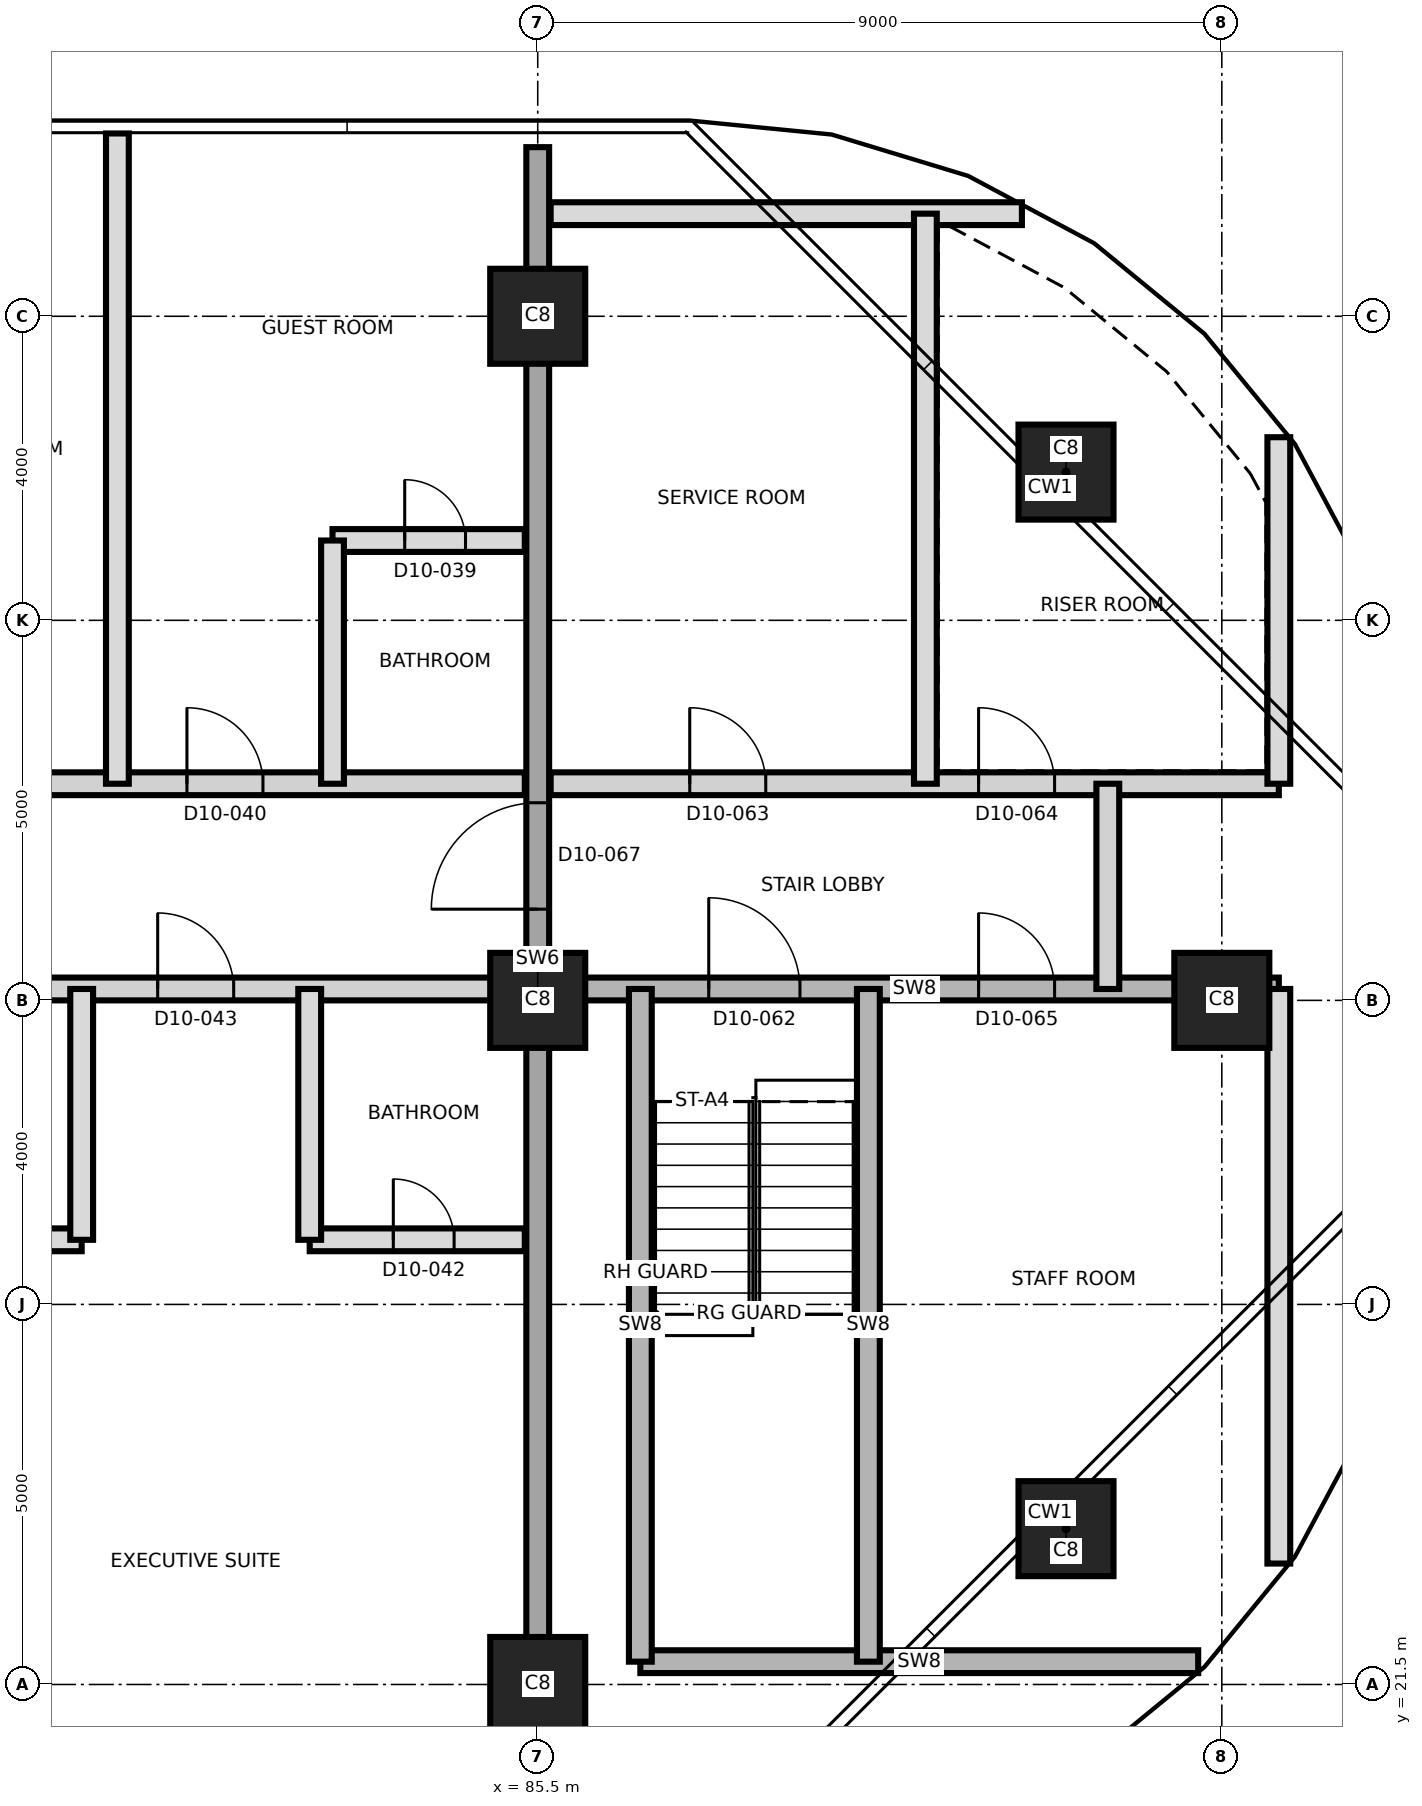
"""IFC4 building model, lengths in metres.
Left out: names, types, materials, properties, quantities, classifications, styles, units other than length and angle.
Written with IfcOpenShell. Run it as: python <this file> out.ifc"""

import sys

from ifc_helpers import new_model, si_unit, direction, frame, frame_2d, origin, origin_2d, place, context, subcontext, project, spatial, rectangle, extrude, element, fill, save


model = new_model("IFC4")
c1 = context("Model", 3, precision=1e-05, world=origin(), true_north=direction((0.0, 1.0)))
c2 = subcontext(c1, "Body", "Model", "MODEL_VIEW")
j1 = project(units=[si_unit("LENGTHUNIT", "METRE"), si_unit("PLANEANGLEUNIT", "RADIAN")], contexts=[c1])
p1 = place(None, origin())
s1 = spatial("IfcSite", under=j1, at=p1, CompositionType="ELEMENT")
p2 = place(p1, origin())
s2 = spatial("IfcBuilding", under=s1, at=p2, CompositionType="ELEMENT")
p3 = place(p2, frame((0.0, 0.0, 120.4)))
s3 = spatial("IfcBuildingStorey", under=s2, at=p3, CompositionType="ELEMENT", Elevation=120.4)
for number, where, z_axis, x_axis in (
    (1, (85.5, 21.5, 0.0), (0.0, 0.0, 1.0), (1.0, 0.0, 0.0)),
    (2, (92.45, 23.55, 0.0), (0.0, 0.0, 1.0), (1.0, 0.0, 0.0)),
    (3, (85.5, 30.5, 0.0), (0.0, 0.0, 1.0), (1.0, 0.0, 0.0)),
    (4, (94.5, 30.5, 0.0), (0.0, 0.0, 1.0), (1.0, 0.0, 0.0)),
    (5, (92.45, 37.45, 0.0), (0.0, 0.0, 1.0), (1.0, 0.0, 0.0)),
    (6, (85.5, 39.5, 0.0), (0.0, 0.0, 1.0), (1.0, 0.0, 0.0)),
):
    element("IfcColumn", number, at=place(p3, frame(where, z_axis=z_axis, x_axis=x_axis)), inside=s3, PredefinedType="COLUMN", context=c2, shape_type="SweptSolid", body=[
        extrude(rectangle(XDim=1.25, YDim=1.25, at=origin_2d()), origin(), (0.0, 0.0, 1.0), 3.7),
    ])
p4 = place(p3, frame((85.5, 19.275, 0.0), z_axis=(0.0, 0.0, 1.0), x_axis=(0.0, 1.0, 0.0)))
e7 = element("IfcWall", 7, at=p4, inside=s3, PredefinedType="SHEAR", context=c2, shape_type="SweptSolid", body=[
    extrude(rectangle(XDim=22.45, YDim=0.3, at=frame_2d((11.225, 0.0))), origin(), (0.0, 0.0, 1.0), 3.7),
])
p5 = place(p4, frame((12.425, 0.0, 0.0)))
e8 = element("IfcOpeningElement", 8, at=p5, cuts=e7, PredefinedType="OPENING", context=c2, shape_type="SweptSolid", body=[
    extrude(rectangle(XDim=1.4, YDim=2.1, at=frame_2d((0.7, 1.05))), frame((0.0, 0.16, 0.0), z_axis=(0.0, -1.0, 0.0), x_axis=(1.0, 0.0, 0.0)), (0.0, 0.0, 1.0), 0.32),
])
p6 = place(p3, frame((86.85, 21.8, 0.0), z_axis=(0.0, 0.0, 1.0), x_axis=(1.0, 0.0, 0.0)))
e9 = element("IfcWall", 9, at=p6, inside=s3, PredefinedType="SHEAR", context=c2, shape_type="SweptSolid", body=[
    extrude(rectangle(XDim=7.339, YDim=0.3, at=frame_2d((3.669, 0.0))), origin(), (0.0, 0.0, 1.0), 3.4),
])
p7 = place(p3, frame((73.5, 27.35, 0.0), z_axis=(0.0, 0.0, 1.0), x_axis=(1.0, 0.0, 0.0)))
e10 = element("IfcWall", 10, at=p7, inside=s3, PredefinedType="PARTITIONING", context=c2, shape_type="SweptSolid", body=[
    extrude(rectangle(XDim=6.0, YDim=0.3, at=frame_2d((3.0, 0.0))), origin(), (0.0, 0.0, 1.0), 3.4),
])
p8 = place(p7, frame((1.1, 0.0, 0.0)))
e11 = element("IfcOpeningElement", 11, at=p8, cuts=e10, PredefinedType="OPENING", context=c2, shape_type="SweptSolid", body=[
    extrude(rectangle(XDim=0.8, YDim=2.1, at=frame_2d((0.4, 1.05))), frame((0.0, 0.16, 0.0), z_axis=(0.0, -1.0, 0.0), x_axis=(1.0, 0.0, 0.0)), (0.0, 0.0, 1.0), 0.32),
])
p9 = place(p7, frame((4.1, 0.0, 0.0)))
e12 = element("IfcOpeningElement", 12, at=p9, cuts=e10, PredefinedType="OPENING", context=c2, shape_type="SweptSolid", body=[
    extrude(rectangle(XDim=0.8, YDim=2.1, at=frame_2d((0.4, 1.05))), frame((0.0, 0.16, 0.0), z_axis=(0.0, -1.0, 0.0), x_axis=(1.0, 0.0, 0.0)), (0.0, 0.0, 1.0), 0.32),
])
p10 = place(p3, frame((82.5, 27.35, 0.0), z_axis=(0.0, 0.0, 1.0), x_axis=(1.0, 0.0, 0.0)))
e13 = element("IfcWall", 13, at=p10, inside=s3, PredefinedType="PARTITIONING", context=c2, shape_type="SweptSolid", body=[
    extrude(rectangle(XDim=2.83, YDim=0.3, at=frame_2d((1.415, 0.0))), origin(), (0.0, 0.0, 1.0), 3.4),
])
p11 = place(p10, frame((1.1, 0.0, 0.0)))
e14 = element("IfcOpeningElement", 14, at=p11, cuts=e13, PredefinedType="OPENING", context=c2, shape_type="SweptSolid", body=[
    extrude(rectangle(XDim=0.8, YDim=2.1, at=frame_2d((0.4, 1.05))), frame((0.0, 0.16, 0.0), z_axis=(0.0, -1.0, 0.0), x_axis=(1.0, 0.0, 0.0)), (0.0, 0.0, 1.0), 0.32),
])
p12 = place(p3, frame((58.8, 30.65, 0.0), z_axis=(0.0, 0.0, 1.0), x_axis=(1.0, 0.0, 0.0)))
e15 = element("IfcWall", 15, at=p12, inside=s3, PredefinedType="PARTITIONING", context=c2, shape_type="SweptSolid", body=[
    extrude(rectangle(XDim=26.53, YDim=0.3, at=frame_2d((13.265, 0.0))), origin(), (0.0, 0.0, 1.0), 3.4),
])
p13 = place(p12, frame((0.835, 0.0, 0.0)))
e16 = element("IfcOpeningElement", 16, at=p13, cuts=e15, PredefinedType="OPENING", context=c2, shape_type="SweptSolid", body=[
    extrude(rectangle(XDim=1.2, YDim=2.1, at=frame_2d((0.6, 1.05))), frame((0.0, 0.16, 0.0), z_axis=(0.0, -1.0, 0.0), x_axis=(1.0, 0.0, 0.0)), (0.0, 0.0, 1.0), 0.32),
])
p14 = place(p12, frame((4.085, 0.0, 0.0)))
e17 = element("IfcOpeningElement", 17, at=p14, cuts=e15, PredefinedType="OPENING", context=c2, shape_type="SweptSolid", body=[
    extrude(rectangle(XDim=1.0, YDim=2.1, at=frame_2d((0.5, 1.05))), frame((0.0, 0.16, 0.0), z_axis=(0.0, -1.0, 0.0), x_axis=(1.0, 0.0, 0.0)), (0.0, 0.0, 1.0), 0.32),
])
p15 = place(p12, frame((12.7, 0.0, 0.0)))
e18 = element("IfcOpeningElement", 18, at=p15, cuts=e15, PredefinedType="OPENING", context=c2, shape_type="SweptSolid", body=[
    extrude(rectangle(XDim=1.0, YDim=2.4, at=frame_2d((0.5, 1.2))), frame((0.0, 0.16, 0.0), z_axis=(0.0, -1.0, 0.0), x_axis=(1.0, 0.0, 0.0)), (0.0, 0.0, 1.0), 0.32),
])
p16 = place(p12, frame((21.7, 0.0, 0.0)))
e19 = element("IfcOpeningElement", 19, at=p16, cuts=e15, PredefinedType="OPENING", context=c2, shape_type="SweptSolid", body=[
    extrude(rectangle(XDim=1.0, YDim=2.4, at=frame_2d((0.5, 1.2))), frame((0.0, 0.16, 0.0), z_axis=(0.0, -1.0, 0.0), x_axis=(1.0, 0.0, 0.0)), (0.0, 0.0, 1.0), 0.32),
])
p17 = place(p3, frame((85.67, 30.65, 0.0), z_axis=(0.0, 0.0, 1.0), x_axis=(1.0, 0.0, 0.0)))
e20 = element("IfcWall", 20, at=p17, inside=s3, PredefinedType="SHEAR", context=c2, shape_type="SweptSolid", body=[
    extrude(rectangle(XDim=9.58, YDim=0.3, at=frame_2d((4.79, 0.0))), origin(), (0.0, 0.0, 1.0), 3.4),
])
p18 = place(p17, frame((2.08, 0.0, 0.0)))
e21 = element("IfcOpeningElement", 21, at=p18, cuts=e20, PredefinedType="OPENING", context=c2, shape_type="SweptSolid", body=[
    extrude(rectangle(XDim=1.2, YDim=2.1, at=frame_2d((0.6, 1.05))), frame((0.0, 0.16, 0.0), z_axis=(0.0, -1.0, 0.0), x_axis=(1.0, 0.0, 0.0)), (0.0, 0.0, 1.0), 0.32),
])
p19 = place(p17, frame((5.63, 0.0, 0.0)))
e22 = element("IfcOpeningElement", 22, at=p19, cuts=e20, PredefinedType="OPENING", context=c2, shape_type="SweptSolid", body=[
    extrude(rectangle(XDim=1.0, YDim=2.1, at=frame_2d((0.5, 1.05))), frame((0.0, 0.16, 0.0), z_axis=(0.0, -1.0, 0.0), x_axis=(1.0, 0.0, 0.0)), (0.0, 0.0, 1.0), 0.32),
])
p20 = place(p3, frame((58.8, 33.35, 0.0), z_axis=(0.0, 0.0, 1.0), x_axis=(1.0, 0.0, 0.0)))
e23 = element("IfcWall", 23, at=p20, inside=s3, PredefinedType="PARTITIONING", context=c2, shape_type="SweptSolid", body=[
    extrude(rectangle(XDim=26.53, YDim=0.3, at=frame_2d((13.265, 0.0))), origin(), (0.0, 0.0, 1.0), 3.4),
])
p21 = place(p20, frame((0.85, 0.0, 0.0)))
e24 = element("IfcOpeningElement", 24, at=p21, cuts=e23, PredefinedType="OPENING", context=c2, shape_type="SweptSolid", body=[
    extrude(rectangle(XDim=1.0, YDim=2.1, at=frame_2d((0.5, 1.05))), frame((0.0, 0.16, 0.0), z_axis=(0.0, -1.0, 0.0), x_axis=(1.0, 0.0, 0.0)), (0.0, 0.0, 1.0), 0.32),
])
p22 = place(p20, frame((6.7, 0.0, 0.0)))
e25 = element("IfcOpeningElement", 25, at=p22, cuts=e23, PredefinedType="OPENING", context=c2, shape_type="SweptSolid", body=[
    extrude(rectangle(XDim=1.0, YDim=2.1, at=frame_2d((0.5, 1.05))), frame((0.0, 0.16, 0.0), z_axis=(0.0, -1.0, 0.0), x_axis=(1.0, 0.0, 0.0)), (0.0, 0.0, 1.0), 0.32),
])
p23 = place(p20, frame((9.55, 0.0, 0.0)))
e26 = element("IfcOpeningElement", 26, at=p23, cuts=e23, PredefinedType="OPENING", context=c2, shape_type="SweptSolid", body=[
    extrude(rectangle(XDim=1.0, YDim=2.1, at=frame_2d((0.5, 1.05))), frame((0.0, 0.16, 0.0), z_axis=(0.0, -1.0, 0.0), x_axis=(1.0, 0.0, 0.0)), (0.0, 0.0, 1.0), 0.32),
])
p24 = place(p20, frame((15.4, 0.0, 0.0)))
e27 = element("IfcOpeningElement", 27, at=p24, cuts=e23, PredefinedType="OPENING", context=c2, shape_type="SweptSolid", body=[
    extrude(rectangle(XDim=1.0, YDim=2.1, at=frame_2d((0.5, 1.05))), frame((0.0, 0.16, 0.0), z_axis=(0.0, -1.0, 0.0), x_axis=(1.0, 0.0, 0.0)), (0.0, 0.0, 1.0), 0.32),
])
p25 = place(p20, frame((18.835, 0.0, 0.0)))
e28 = element("IfcOpeningElement", 28, at=p25, cuts=e23, PredefinedType="OPENING", context=c2, shape_type="SweptSolid", body=[
    extrude(rectangle(XDim=1.2, YDim=2.1, at=frame_2d((0.6, 1.05))), frame((0.0, 0.16, 0.0), z_axis=(0.0, -1.0, 0.0), x_axis=(1.0, 0.0, 0.0)), (0.0, 0.0, 1.0), 0.32),
])
p26 = place(p20, frame((22.085, 0.0, 0.0)))
e29 = element("IfcOpeningElement", 29, at=p26, cuts=e23, PredefinedType="OPENING", context=c2, shape_type="SweptSolid", body=[
    extrude(rectangle(XDim=1.0, YDim=2.1, at=frame_2d((0.5, 1.05))), frame((0.0, 0.16, 0.0), z_axis=(0.0, -1.0, 0.0), x_axis=(1.0, 0.0, 0.0)), (0.0, 0.0, 1.0), 0.32),
])
p27 = place(p3, frame((85.67, 33.35, 0.0), z_axis=(0.0, 0.0, 1.0), x_axis=(1.0, 0.0, 0.0)))
e30 = element("IfcWall", 30, at=p27, inside=s3, PredefinedType="PARTITIONING", context=c2, shape_type="SweptSolid", body=[
    extrude(rectangle(XDim=9.58, YDim=0.3, at=frame_2d((4.79, 0.0))), origin(), (0.0, 0.0, 1.0), 3.4),
])
p28 = place(p27, frame((1.83, 0.0, 0.0)))
e31 = element("IfcOpeningElement", 31, at=p28, cuts=e30, PredefinedType="OPENING", context=c2, shape_type="SweptSolid", body=[
    extrude(rectangle(XDim=1.0, YDim=2.1, at=frame_2d((0.5, 1.05))), frame((0.0, 0.16, 0.0), z_axis=(0.0, -1.0, 0.0), x_axis=(1.0, 0.0, 0.0)), (0.0, 0.0, 1.0), 0.32),
])
p29 = place(p27, frame((5.63, 0.0, 0.0)))
e32 = element("IfcOpeningElement", 32, at=p29, cuts=e30, PredefinedType="OPENING", context=c2, shape_type="SweptSolid", body=[
    extrude(rectangle(XDim=1.0, YDim=2.1, at=frame_2d((0.5, 1.05))), frame((0.0, 0.16, 0.0), z_axis=(0.0, -1.0, 0.0), x_axis=(1.0, 0.0, 0.0)), (0.0, 0.0, 1.0), 0.32),
])
p30 = place(p3, frame((82.8, 36.55, 0.0), z_axis=(0.0, 0.0, 1.0), x_axis=(1.0, 0.0, 0.0)))
e33 = element("IfcWall", 33, at=p30, inside=s3, PredefinedType="PARTITIONING", context=c2, shape_type="SweptSolid", body=[
    extrude(rectangle(XDim=2.53, YDim=0.3, at=frame_2d((1.265, 0.0))), origin(), (0.0, 0.0, 1.0), 3.4),
])
p31 = place(p30, frame((0.95, 0.0, 0.0)))
e34 = element("IfcOpeningElement", 34, at=p31, cuts=e33, PredefinedType="OPENING", context=c2, shape_type="SweptSolid", body=[
    extrude(rectangle(XDim=0.8, YDim=2.1, at=frame_2d((0.4, 1.05))), frame((0.0, 0.16, 0.0), z_axis=(0.0, -1.0, 0.0), x_axis=(1.0, 0.0, 0.0)), (0.0, 0.0, 1.0), 0.32),
])
p32 = place(p3, frame((85.67, 40.85, 0.0), z_axis=(0.0, 0.0, 1.0), x_axis=(1.0, 0.0, 0.0)))
e35 = element("IfcWall", 35, at=p32, inside=s3, PredefinedType="PARTITIONING", context=c2, shape_type="SweptSolid", body=[
    extrude(rectangle(XDim=6.2, YDim=0.3, at=frame_2d((3.1, 0.0))), origin(), (0.0, 0.0, 1.0), 3.35),
])
p33 = place(p3, frame((79.5, 27.35, 0.0), z_axis=(0.0, 0.0, 1.0), x_axis=(0.0, 1.0, 0.0)))
e36 = element("IfcWall", 36, at=p33, inside=s3, PredefinedType="PARTITIONING", context=c2, shape_type="SweptSolid", body=[
    extrude(rectangle(XDim=3.3, YDim=0.3, at=frame_2d((1.65, 0.0))), origin(), (0.0, 0.0, 1.0), 3.4),
])
p34 = place(p3, frame((79.97, 33.35, 0.0), z_axis=(0.0, 0.0, 1.0), x_axis=(0.0, 1.0, 0.0)))
e37 = element("IfcWall", 37, at=p34, inside=s3, PredefinedType="PARTITIONING", context=c2, shape_type="SweptSolid", body=[
    extrude(rectangle(XDim=8.555, YDim=0.3, at=frame_2d((4.277, 0.0))), origin(), (0.0, 0.0, 1.0), 3.35),
])
p35 = place(p3, frame((82.5, 27.35, 0.0), z_axis=(0.0, 0.0, 1.0), x_axis=(0.0, 1.0, 0.0)))
e38 = element("IfcWall", 38, at=p35, inside=s3, PredefinedType="PARTITIONING", context=c2, shape_type="SweptSolid", body=[
    extrude(rectangle(XDim=3.3, YDim=0.3, at=frame_2d((1.65, 0.0))), origin(), (0.0, 0.0, 1.0), 3.4),
])
p36 = place(p3, frame((82.8, 33.35, 0.0), z_axis=(0.0, 0.0, 1.0), x_axis=(0.0, 1.0, 0.0)))
e39 = element("IfcWall", 39, at=p36, inside=s3, PredefinedType="PARTITIONING", context=c2, shape_type="SweptSolid", body=[
    extrude(rectangle(XDim=3.2, YDim=0.3, at=frame_2d((1.6, 0.0))), origin(), (0.0, 0.0, 1.0), 3.4),
])
for number, where, z_axis, x_axis in (
    (40, (86.85, 21.8, 0.0), (0.0, 0.0, 1.0), (0.0, 1.0, 0.0)),
    (41, (89.85, 21.8, 0.0), (0.0, 0.0, 1.0), (0.0, 1.0, 0.0)),
):
    element("IfcWall", number, at=place(p3, frame(where, z_axis=z_axis, x_axis=x_axis)), inside=s3, PredefinedType="SHEAR", context=c2, shape_type="SweptSolid", body=[
        extrude(rectangle(XDim=8.85, YDim=0.3, at=frame_2d((4.425, 0.0))), origin(), (0.0, 0.0, 1.0), 3.4),
    ])
p37 = place(p3, frame((90.6, 33.35, 0.0), z_axis=(0.0, 0.0, 1.0), x_axis=(0.0, 1.0, 0.0)))
e42 = element("IfcWall", 42, at=p37, inside=s3, PredefinedType="PARTITIONING", context=c2, shape_type="SweptSolid", body=[
    extrude(rectangle(XDim=7.5, YDim=0.3, at=frame_2d((3.75, 0.0))), origin(), (0.0, 0.0, 1.0), 3.35),
])
p38 = place(p3, frame((93.0, 30.65, 0.0), z_axis=(0.0, 0.0, 1.0), x_axis=(0.0, 1.0, 0.0)))
e43 = element("IfcWall", 43, at=p38, inside=s3, PredefinedType="PARTITIONING", context=c2, shape_type="SweptSolid", body=[
    extrude(rectangle(XDim=2.7, YDim=0.3, at=frame_2d((1.35, 0.0))), origin(), (0.0, 0.0, 1.0), 3.4),
])
p39 = place(p3, frame((95.25, 23.091, 0.0), z_axis=(0.0, 0.0, 1.0), x_axis=(0.0, 1.0, 0.0)))
e44 = element("IfcWall", 44, at=p39, inside=s3, PredefinedType="PARTITIONING", context=c2, shape_type="SweptSolid", body=[
    extrude(rectangle(XDim=7.559, YDim=0.3, at=frame_2d((3.779, 0.0))), origin(), (0.0, 0.0, 1.0), 3.35),
])
p40 = place(p3, frame((95.25, 33.35, 0.0), z_axis=(0.0, 0.0, 1.0), x_axis=(0.0, 1.0, 0.0)))
e45 = element("IfcWall", 45, at=p40, inside=s3, PredefinedType="PARTITIONING", context=c2, shape_type="SweptSolid", body=[
    extrude(rectangle(XDim=4.559, YDim=0.3, at=frame_2d((2.279, 0.0))), origin(), (0.0, 0.0, 1.0), 3.35),
])
p41 = place(p31, origin())
e46 = element("IfcDoor", 46, at=p41, inside=s3, OperationType="SINGLE_SWING_RIGHT", PredefinedType="DOOR", context=c2, shape_type="SweptSolid", body=[
    extrude(rectangle(XDim=0.8, YDim=2.1, at=frame_2d((0.4, 1.05))), frame((0.0, 0.025, 0.0), z_axis=(0.0, -1.0, 0.0), x_axis=(1.0, 0.0, 0.0)), (0.0, 0.0, 1.0), 0.05),
])
fill(e34, e46)
p42 = place(p26, origin())
e47 = element("IfcDoor", 47, at=p42, inside=s3, OperationType="SINGLE_SWING_LEFT", PredefinedType="DOOR", context=c2, shape_type="SweptSolid", body=[
    extrude(rectangle(XDim=1.0, YDim=2.1, at=frame_2d((0.5, 1.05))), frame((0.0, 0.025, 0.0), z_axis=(0.0, -1.0, 0.0), x_axis=(1.0, 0.0, 0.0)), (0.0, 0.0, 1.0), 0.05),
])
fill(e29, e47)
p43 = place(p11, origin())
e48 = element("IfcDoor", 48, at=p43, inside=s3, OperationType="SINGLE_SWING_RIGHT", PredefinedType="DOOR", context=c2, shape_type="SweptSolid", body=[
    extrude(rectangle(XDim=0.8, YDim=2.1, at=frame_2d((0.4, 1.05))), frame((0.0, 0.025, 0.0), z_axis=(0.0, -1.0, 0.0), x_axis=(1.0, 0.0, 0.0)), (0.0, 0.0, 1.0), 0.05),
])
fill(e14, e48)
p44 = place(p16, origin())
e49 = element("IfcDoor", 49, at=p44, inside=s3, OperationType="SINGLE_SWING_LEFT", PredefinedType="DOOR", context=c2, shape_type="SweptSolid", body=[
    extrude(rectangle(XDim=1.0, YDim=2.4, at=frame_2d((0.5, 1.2))), frame((0.0, 0.025, 0.0), z_axis=(0.0, -1.0, 0.0), x_axis=(1.0, 0.0, 0.0)), (0.0, 0.0, 1.0), 0.05),
])
fill(e19, e49)
p45 = place(p18, origin())
e50 = element("IfcDoor", 50, at=p45, inside=s3, OperationType="SINGLE_SWING_LEFT", PredefinedType="DOOR", context=c2, shape_type="SweptSolid", body=[
    extrude(rectangle(XDim=1.2, YDim=2.1, at=frame_2d((0.6, 1.05))), frame((0.0, 0.025, 0.0), z_axis=(0.0, -1.0, 0.0), x_axis=(1.0, 0.0, 0.0)), (0.0, 0.0, 1.0), 0.05),
])
fill(e21, e50)
p46 = place(p28, origin())
e51 = element("IfcDoor", 51, at=p46, inside=s3, OperationType="SINGLE_SWING_LEFT", PredefinedType="DOOR", context=c2, shape_type="SweptSolid", body=[
    extrude(rectangle(XDim=1.0, YDim=2.1, at=frame_2d((0.5, 1.05))), frame((0.0, 0.025, 0.0), z_axis=(0.0, -1.0, 0.0), x_axis=(1.0, 0.0, 0.0)), (0.0, 0.0, 1.0), 0.05),
])
fill(e31, e51)
p47 = place(p29, origin())
e52 = element("IfcDoor", 52, at=p47, inside=s3, OperationType="SINGLE_SWING_RIGHT", PredefinedType="DOOR", context=c2, shape_type="SweptSolid", body=[
    extrude(rectangle(XDim=1.0, YDim=2.1, at=frame_2d((0.5, 1.05))), frame((0.0, 0.025, 0.0), z_axis=(0.0, -1.0, 0.0), x_axis=(1.0, 0.0, 0.0)), (0.0, 0.0, 1.0), 0.05),
])
fill(e32, e52)
p48 = place(p19, origin())
e53 = element("IfcDoor", 53, at=p48, inside=s3, OperationType="SINGLE_SWING_LEFT", PredefinedType="DOOR", context=c2, shape_type="SweptSolid", body=[
    extrude(rectangle(XDim=1.0, YDim=2.1, at=frame_2d((0.5, 1.05))), frame((0.0, 0.025, 0.0), z_axis=(0.0, -1.0, 0.0), x_axis=(1.0, 0.0, 0.0)), (0.0, 0.0, 1.0), 0.05),
])
fill(e22, e53)
p49 = place(p5, origin())
e54 = element("IfcDoor", 54, at=p49, inside=s3, OperationType="SINGLE_SWING_RIGHT", PredefinedType="DOOR", context=c2, shape_type="SweptSolid", body=[
    extrude(rectangle(XDim=1.4, YDim=2.1, at=frame_2d((0.7, 1.05))), frame((0.0, 0.025, 0.0), z_axis=(0.0, -1.0, 0.0), x_axis=(1.0, 0.0, 0.0)), (0.0, 0.0, 1.0), 0.05),
])
fill(e8, e54)
save(model, sys.argv[1])
